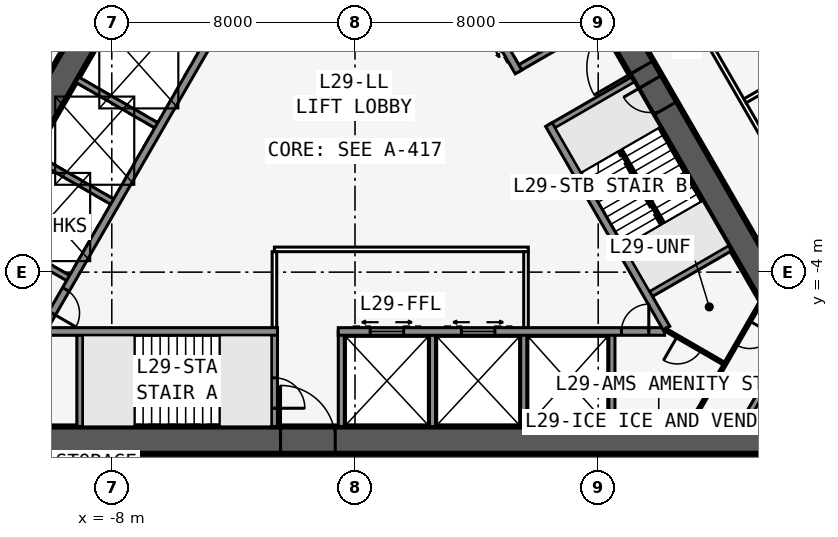
"""IFC4 building model, lengths in metres.
Left out: names, types, materials, properties, quantities, classifications, styles, units other than length and angle.
Written with IfcOpenShell. Run it as: python <this file> out.ifc"""

import sys

from ifc_helpers import new_model, si_unit, direction, frame, frame_2d, origin, place, context, subcontext, project, spatial, rectangle, extrude, element, fill, save


model = new_model("IFC4")
c1 = context("Model", 3, precision=1e-05, world=origin(), true_north=direction((0.0, 1.0)))
c2 = subcontext(c1, "Body", "Model", "MODEL_VIEW")
j1 = project(units=[si_unit("LENGTHUNIT", "METRE"), si_unit("PLANEANGLEUNIT", "RADIAN")], contexts=[c1])
p1 = place(None, origin())
s1 = spatial("IfcSite", under=j1, at=p1, CompositionType="ELEMENT")
p2 = place(p1, origin())
s2 = spatial("IfcBuilding", under=s1, at=p2, CompositionType="ELEMENT")
p3 = place(p2, frame((0.0, 0.0, 114.7)))
s3 = spatial("IfcBuildingStorey", under=s2, at=p3, CompositionType="ELEMENT", Elevation=114.7)
p4 = place(p3, frame((-16.5, -9.526, 0.0), z_axis=(0.0, 0.0, 1.0), x_axis=(1.0, 0.0, 0.0)))
e1 = element("IfcWall", 1, at=p4, inside=s3, PredefinedType="SHEAR", context=c2, shape_type="SweptSolid", body=[
    extrude(rectangle(XDim=33.0, YDim=0.9, at=frame_2d((16.5, 0.0))), origin(), (0.0, 0.0, 1.0), 3.4),
])
p5 = place(p4, frame((14.05, 0.0, 0.0)))
e2 = element("IfcOpeningElement", 2, at=p5, cuts=e1, PredefinedType="OPENING", context=c2, shape_type="SweptSolid", body=[
    extrude(rectangle(XDim=1.8, YDim=2.13, at=frame_2d((0.9, 1.065))), frame((0.0, 0.46, 0.0), z_axis=(0.0, -1.0, 0.0), x_axis=(1.0, 0.0, 0.0)), (0.0, 0.0, 1.0), 0.92),
])
p6 = place(p3, frame((-10.183, -5.951, 0.0), z_axis=(0.0, 0.0, 1.0), x_axis=(1.0, 0.0, 0.0)))
e3 = element("IfcWall", 3, at=p6, inside=s3, PredefinedType="SOLIDWALL", context=c2, shape_type="SweptSolid", body=[
    extrude(rectangle(XDim=7.633, YDim=0.25, at=frame_2d((3.816, 0.0))), origin(), (0.0, 0.0, 1.0), 3.235),
])
p7 = place(p3, frame((-0.55, -5.951, 0.0), z_axis=(0.0, 0.0, 1.0), x_axis=(1.0, 0.0, 0.0)))
e4 = element("IfcWall", 4, at=p7, inside=s3, PredefinedType="SOLIDWALL", context=c2, shape_type="SweptSolid", body=[
    extrude(rectangle(XDim=10.733, YDim=0.25, at=frame_2d((5.366, 0.0))), origin(), (0.0, 0.0, 1.0), 3.235),
])
p8 = place(p7, frame((9.314, 0.0, 0.0)))
e5 = element("IfcOpeningElement", 5, at=p8, cuts=e4, PredefinedType="OPENING", context=c2, shape_type="SweptSolid", body=[
    extrude(rectangle(XDim=0.9, YDim=2.13, at=frame_2d((0.45, 1.065))), frame((0.0, 0.135, 0.0), z_axis=(0.0, -1.0, 0.0), x_axis=(1.0, 0.0, 0.0)), (0.0, 0.0, 1.0), 0.27),
])
p9 = place(p7, frame((1.05, 0.0, 0.0)))
e6 = element("IfcOpeningElement", 6, at=p9, cuts=e4, PredefinedType="OPENING", context=c2, shape_type="SweptSolid", body=[
    extrude(rectangle(XDim=1.1, YDim=2.13, at=frame_2d((0.55, 1.065))), frame((0.0, 0.135, 0.0), z_axis=(0.0, -1.0, 0.0), x_axis=(1.0, 0.0, 0.0)), (0.0, 0.0, 1.0), 0.27),
])
p10 = place(p7, frame((4.05, 0.0, 0.0)))
e7 = element("IfcOpeningElement", 7, at=p10, cuts=e4, PredefinedType="OPENING", context=c2, shape_type="SweptSolid", body=[
    extrude(rectangle(XDim=1.1, YDim=2.13, at=frame_2d((0.55, 1.065))), frame((0.0, 0.135, 0.0), z_axis=(0.0, -1.0, 0.0), x_axis=(1.0, 0.0, 0.0)), (0.0, 0.0, 1.0), 0.27),
])
p11 = place(p3, frame((-9.05, -5.951, 0.0), z_axis=(0.0, 0.0, 1.0), x_axis=(0.0, -1.0, 0.0)))
e8 = element("IfcWall", 8, at=p11, inside=s3, PredefinedType="SOLIDWALL", context=c2, shape_type="SweptSolid", body=[
    extrude(rectangle(XDim=3.125, YDim=0.2, at=frame_2d((1.562, 0.0))), origin(), (0.0, 0.0, 1.0), 3.235),
])
p12 = place(p3, frame((-2.65, -5.951, 0.0), z_axis=(0.0, 0.0, 1.0), x_axis=(0.0, -1.0, 0.0)))
e9 = element("IfcWall", 9, at=p12, inside=s3, PredefinedType="SOLIDWALL", context=c2, shape_type="SweptSolid", body=[
    extrude(rectangle(XDim=3.125, YDim=0.2, at=frame_2d((1.562, 0.0))), origin(), (0.0, 0.0, 1.0), 3.235),
])
p13 = place(p12, frame((1.525, 0.0, 0.0)))
e10 = element("IfcOpeningElement", 10, at=p13, cuts=e9, PredefinedType="OPENING", context=c2, shape_type="SweptSolid", body=[
    extrude(rectangle(XDim=1.0, YDim=2.13, at=frame_2d((0.5, 1.065))), frame((0.0, 0.11, 0.0), z_axis=(0.0, -1.0, 0.0), x_axis=(1.0, 0.0, 0.0)), (0.0, 0.0, 1.0), 0.22),
])
for number, where, z_axis, x_axis in (
    (11, (-0.45, -5.951, 0.0), (0.0, 0.0, 1.0), (0.0, -1.0, 0.0)),
    (12, (2.55, -5.951, 0.0), (0.0, 0.0, 1.0), (0.0, -1.0, 0.0)),
    (13, (5.55, -5.951, 0.0), (0.0, 0.0, 1.0), (0.0, -1.0, 0.0)),
    (14, (8.45, -5.951, 0.0), (0.0, 0.0, 1.0), (0.0, -1.0, 0.0)),
):
    element("IfcWall", number, at=place(p3, frame(where, z_axis=z_axis, x_axis=x_axis)), inside=s3, PredefinedType="SOLIDWALL", context=c2, shape_type="SweptSolid", body=[
        extrude(rectangle(XDim=3.125, YDim=0.2, at=frame_2d((1.562, 0.0))), origin(), (0.0, 0.0, 1.0), 3.235),
    ])
p14 = place(p3, frame((16.5, -9.526, 0.0), z_axis=(0.0, 0.0, 1.0), x_axis=(-0.499999749417, 0.866025548458, 0.0)))
e15 = element("IfcWall", 15, at=p14, inside=s3, PredefinedType="SHEAR", context=c2, shape_type="SweptSolid", body=[
    extrude(rectangle(XDim=33.0, YDim=0.9, at=frame_2d((16.5, 0.0))), origin(), (0.0, 0.0, 1.0), 3.4),
])
p15 = place(p14, frame((14.15, 0.0, 0.0)))
e16 = element("IfcOpeningElement", 16, at=p15, cuts=e15, PredefinedType="OPENING", context=c2, shape_type="SweptSolid", body=[
    extrude(rectangle(XDim=1.8, YDim=2.13, at=frame_2d((0.9, 1.065))), frame((0.0, 0.46, 0.0), z_axis=(0.0, -1.0, 0.0), x_axis=(1.0, 0.0, 0.0)), (0.0, 0.0, 1.0), 0.92),
])
p16 = place(p14, frame((12.6, 0.0, 0.0)))
e17 = element("IfcOpeningElement", 17, at=p16, cuts=e15, PredefinedType="OPENING", context=c2, shape_type="SweptSolid", body=[
    extrude(rectangle(XDim=1.0, YDim=2.13, at=frame_2d((0.5, 1.065))), frame((0.0, 0.46, 0.0), z_axis=(0.0, -1.0, 0.0), x_axis=(1.0, 0.0, 0.0)), (0.0, 0.0, 1.0), 0.92),
])
p17 = place(p3, frame((10.245, -5.843, 0.0), z_axis=(0.0, 0.0, 1.0), x_axis=(-0.499993009313, 0.866029439822, 0.0)))
e18 = element("IfcWall", 18, at=p17, inside=s3, PredefinedType="SOLIDWALL", context=c2, shape_type="SweptSolid", body=[
    extrude(rectangle(XDim=7.733, YDim=0.25, at=frame_2d((3.866, 0.0))), origin(), (0.0, 0.0, 1.0), 3.235),
])
p18 = place(p3, frame((5.379, 2.586, 0.0), z_axis=(0.0, 0.0, 1.0), x_axis=(-0.500001375892, 0.866024609411, 0.0)))
e19 = element("IfcWall", 19, at=p18, inside=s3, PredefinedType="SOLIDWALL", context=c2, shape_type="SweptSolid", body=[
    extrude(rectangle(XDim=10.633, YDim=0.25, at=frame_2d((5.316, 0.0))), origin(), (0.0, 0.0, 1.0), 3.235),
])
p19 = place(p18, frame((9.164, 0.0, 0.0)))
e20 = element("IfcOpeningElement", 20, at=p19, cuts=e19, PredefinedType="OPENING", context=c2, shape_type="SweptSolid", body=[
    extrude(rectangle(XDim=0.9, YDim=2.13, at=frame_2d((0.45, 1.065))), frame((0.0, 0.135, 0.0), z_axis=(0.0, -1.0, 0.0), x_axis=(1.0, 0.0, 0.0)), (0.0, 0.0, 1.0), 0.27),
])
p20 = place(p18, frame((1.0, 0.0, 0.0)))
e21 = element("IfcOpeningElement", 21, at=p20, cuts=e19, PredefinedType="OPENING", context=c2, shape_type="SweptSolid", body=[
    extrude(rectangle(XDim=1.1, YDim=2.13, at=frame_2d((0.55, 1.065))), frame((0.0, 0.135, 0.0), z_axis=(0.0, -1.0, 0.0), x_axis=(1.0, 0.0, 0.0)), (0.0, 0.0, 1.0), 0.27),
])
p21 = place(p18, frame((3.9, 0.0, 0.0)))
e22 = element("IfcOpeningElement", 22, at=p21, cuts=e19, PredefinedType="OPENING", context=c2, shape_type="SweptSolid", body=[
    extrude(rectangle(XDim=1.1, YDim=2.13, at=frame_2d((0.55, 1.065))), frame((0.0, 0.135, 0.0), z_axis=(0.0, -1.0, 0.0), x_axis=(1.0, 0.0, 0.0)), (0.0, 0.0, 1.0), 0.27),
])
p22 = place(p18, frame((6.8, 0.0, 0.0)))
e23 = element("IfcOpeningElement", 23, at=p22, cuts=e19, PredefinedType="OPENING", context=c2, shape_type="SweptSolid", body=[
    extrude(rectangle(XDim=1.1, YDim=2.13, at=frame_2d((0.55, 1.065))), frame((0.0, 0.135, 0.0), z_axis=(0.0, -1.0, 0.0), x_axis=(1.0, 0.0, 0.0)), (0.0, 0.0, 1.0), 0.27),
])
for number, where, z_axis, x_axis in (
    (24, (9.629, -4.775, 0.0), (0.0, 0.0, 1.0), (0.866, 0.5, 0.0)),
    (25, (6.429, 0.767, 0.0), (0.0, 0.0, 1.0), (0.866, 0.5, 0.0)),
    (26, (5.329, 2.673, 0.0), (0.0, 0.0, 1.0), (0.866, 0.5, 0.0)),
):
    element("IfcWall", number, at=place(p3, frame(where, z_axis=z_axis, x_axis=x_axis)), inside=s3, PredefinedType="SOLIDWALL", context=c2, shape_type="SweptSolid", body=[
        extrude(rectangle(XDim=3.125, YDim=0.2, at=frame_2d((1.562, 0.0))), origin(), (0.0, 0.0, 1.0), 3.235),
    ])
p23 = place(p3, frame((0.0, 19.052, 0.0), z_axis=(0.0, 0.0, 1.0), x_axis=(-0.499999749417, -0.866025548458, 0.0)))
e27 = element("IfcWall", 27, at=p23, inside=s3, PredefinedType="SHEAR", context=c2, shape_type="SweptSolid", body=[
    extrude(rectangle(XDim=33.0, YDim=0.9, at=frame_2d((16.5, 0.0))), origin(), (0.0, 0.0, 1.0), 3.4),
])
p24 = place(p23, frame((14.15, 0.0, 0.0)))
e28 = element("IfcOpeningElement", 28, at=p24, cuts=e27, PredefinedType="OPENING", context=c2, shape_type="SweptSolid", body=[
    extrude(rectangle(XDim=1.8, YDim=2.13, at=frame_2d((0.9, 1.065))), frame((0.0, 0.46, 0.0), z_axis=(0.0, -1.0, 0.0), x_axis=(1.0, 0.0, 0.0)), (0.0, 0.0, 1.0), 0.92),
])
p25 = place(p23, frame((12.6, 0.0, 0.0)))
e29 = element("IfcOpeningElement", 29, at=p25, cuts=e27, PredefinedType="OPENING", context=c2, shape_type="SweptSolid", body=[
    extrude(rectangle(XDim=1.0, YDim=2.13, at=frame_2d((0.5, 1.065))), frame((0.0, 0.46, 0.0), z_axis=(0.0, -1.0, 0.0), x_axis=(1.0, 0.0, 0.0)), (0.0, 0.0, 1.0), 0.92),
])
p26 = place(p3, frame((-4.929, 3.365, 0.0), z_axis=(0.0, 0.0, 1.0), x_axis=(-0.499991433582, -0.866030349552, 0.0)))
e30 = element("IfcWall", 30, at=p26, inside=s3, PredefinedType="SOLIDWALL", context=c2, shape_type="SweptSolid", body=[
    extrude(rectangle(XDim=10.633, YDim=0.25, at=frame_2d((5.316, 0.0))), origin(), (0.0, 0.0, 1.0), 3.235),
])
p27 = place(p26, frame((9.164, 0.0, 0.0)))
e31 = element("IfcOpeningElement", 31, at=p27, cuts=e30, PredefinedType="OPENING", context=c2, shape_type="SweptSolid", body=[
    extrude(rectangle(XDim=0.9, YDim=2.13, at=frame_2d((0.45, 1.065))), frame((0.0, 0.135, 0.0), z_axis=(0.0, -1.0, 0.0), x_axis=(1.0, 0.0, 0.0)), (0.0, 0.0, 1.0), 0.27),
])
for number, where, z_axis, x_axis in (
    (32, (-4.979, 3.279, 0.0), (0.0, 0.0, 1.0), (-0.866, 0.5, 0.0)),
    (33, (-6.429, 0.767, 0.0), (0.0, 0.0, 1.0), (-0.866, 0.5, 0.0)),
    (34, (-7.879, -1.744, 0.0), (0.0, 0.0, 1.0), (-0.866, 0.5, 0.0)),
    (35, (-9.329, -4.256, 0.0), (0.0, 0.0, 1.0), (-0.866, 0.5, 0.0)),
):
    element("IfcWall", number, at=place(p3, frame(where, z_axis=z_axis, x_axis=x_axis)), inside=s3, PredefinedType="SOLIDWALL", context=c2, shape_type="SweptSolid", body=[
        extrude(rectangle(XDim=3.125, YDim=0.2, at=frame_2d((1.562, 0.0))), origin(), (0.0, 0.0, 1.0), 3.235),
    ])
p28 = place(p3, frame((20.027, -10.985, 0.0), z_axis=(0.0, 0.0, 1.0), x_axis=(-0.500001677587, 0.866024435227, 0.0)))
e36 = element("IfcWall", 36, at=p28, inside=s3, PredefinedType="PARTITIONING", context=c2, shape_type="SweptSolid", body=[
    extrude(rectangle(XDim=39.054, YDim=0.15, at=frame_2d((19.527, 0.0))), origin(), (0.0, 0.0, 1.0), 3.235),
])
p29 = place(p28, frame((0.352, 0.0, 0.0)))
e37 = element("IfcOpeningElement", 37, at=p29, cuts=e36, PredefinedType="OPENING", context=c2, shape_type="SweptSolid", body=[
    extrude(rectangle(XDim=0.95, YDim=2.13, at=frame_2d((0.475, 1.065))), frame((0.0, 0.085, 0.0), z_axis=(0.0, -1.0, 0.0), x_axis=(1.0, 0.0, 0.0)), (0.0, 0.0, 1.0), 0.17),
])
p30 = place(p28, frame((7.752, 0.0, 0.0)))
e38 = element("IfcOpeningElement", 38, at=p30, cuts=e36, PredefinedType="OPENING", context=c2, shape_type="SweptSolid", body=[
    extrude(rectangle(XDim=0.95, YDim=2.13, at=frame_2d((0.475, 1.065))), frame((0.0, 0.085, 0.0), z_axis=(0.0, -1.0, 0.0), x_axis=(1.0, 0.0, 0.0)), (0.0, 0.0, 1.0), 0.17),
])
p31 = place(p28, frame((17.752, 0.0, 0.0)))
e39 = element("IfcOpeningElement", 39, at=p31, cuts=e36, PredefinedType="OPENING", context=c2, shape_type="SweptSolid", body=[
    extrude(rectangle(XDim=0.95, YDim=2.13, at=frame_2d((0.475, 1.065))), frame((0.0, 0.085, 0.0), z_axis=(0.0, -1.0, 0.0), x_axis=(1.0, 0.0, 0.0)), (0.0, 0.0, 1.0), 0.17),
])
p32 = place(p28, frame((22.152, 0.0, 0.0)))
e40 = element("IfcOpeningElement", 40, at=p32, cuts=e36, PredefinedType="OPENING", context=c2, shape_type="SweptSolid", body=[
    extrude(rectangle(XDim=0.95, YDim=2.13, at=frame_2d((0.475, 1.065))), frame((0.0, 0.085, 0.0), z_axis=(0.0, -1.0, 0.0), x_axis=(1.0, 0.0, 0.0)), (0.0, 0.0, 1.0), 0.17),
])
p33 = place(p28, frame((27.152, 0.0, 0.0)))
e41 = element("IfcOpeningElement", 41, at=p33, cuts=e36, PredefinedType="OPENING", context=c2, shape_type="SweptSolid", body=[
    extrude(rectangle(XDim=0.95, YDim=2.13, at=frame_2d((0.475, 1.065))), frame((0.0, 0.085, 0.0), z_axis=(0.0, -1.0, 0.0), x_axis=(1.0, 0.0, 0.0)), (0.0, 0.0, 1.0), 0.17),
])
p34 = place(p28, frame((36.546, 0.0, 0.0)))
e42 = element("IfcOpeningElement", 42, at=p34, cuts=e36, PredefinedType="OPENING", context=c2, shape_type="SweptSolid", body=[
    extrude(rectangle(XDim=0.95, YDim=2.13, at=frame_2d((0.475, 1.065))), frame((0.0, 0.085, 0.0), z_axis=(0.0, -1.0, 0.0), x_axis=(1.0, 0.0, 0.0)), (0.0, 0.0, 1.0), 0.17),
])
p35 = place(p3, frame((12.829, 1.633, 0.0), z_axis=(0.0, 0.0, 1.0), x_axis=(0.866027015393, 0.499997208602, 0.0)))
e43 = element("IfcWall", 43, at=p35, inside=s3, PredefinedType="PARTITIONING", context=c2, shape_type="SweptSolid", body=[
    extrude(rectangle(XDim=8.922, YDim=0.15, at=frame_2d((4.461, 0.0))), origin(), (0.0, 0.0, 1.0), 2.389),
])
p36 = place(p3, frame((-0.5, 22.836, 0.0), z_axis=(0.0, 0.0, 1.0), x_axis=(-0.500001677587, -0.866024435227, 0.0)))
e44 = element("IfcWall", 44, at=p36, inside=s3, PredefinedType="PARTITIONING", context=c2, shape_type="SweptSolid", body=[
    extrude(rectangle(XDim=39.054, YDim=0.15, at=frame_2d((19.527, 0.0))), origin(), (0.0, 0.0, 1.0), 3.235),
])
p37 = place(p36, frame((0.352, 0.0, 0.0)))
e45 = element("IfcOpeningElement", 45, at=p37, cuts=e44, PredefinedType="OPENING", context=c2, shape_type="SweptSolid", body=[
    extrude(rectangle(XDim=0.95, YDim=2.13, at=frame_2d((0.475, 1.065))), frame((0.0, 0.085, 0.0), z_axis=(0.0, -1.0, 0.0), x_axis=(1.0, 0.0, 0.0)), (0.0, 0.0, 1.0), 0.17),
])
p38 = place(p36, frame((7.152, 0.0, 0.0)))
e46 = element("IfcOpeningElement", 46, at=p38, cuts=e44, PredefinedType="OPENING", context=c2, shape_type="SweptSolid", body=[
    extrude(rectangle(XDim=0.95, YDim=2.13, at=frame_2d((0.475, 1.065))), frame((0.0, 0.085, 0.0), z_axis=(0.0, -1.0, 0.0), x_axis=(1.0, 0.0, 0.0)), (0.0, 0.0, 1.0), 0.17),
])
p39 = place(p36, frame((12.152, 0.0, 0.0)))
e47 = element("IfcOpeningElement", 47, at=p39, cuts=e44, PredefinedType="OPENING", context=c2, shape_type="SweptSolid", body=[
    extrude(rectangle(XDim=0.95, YDim=2.13, at=frame_2d((0.475, 1.065))), frame((0.0, 0.085, 0.0), z_axis=(0.0, -1.0, 0.0), x_axis=(1.0, 0.0, 0.0)), (0.0, 0.0, 1.0), 0.17),
])
p40 = place(p36, frame((17.152, 0.0, 0.0)))
e48 = element("IfcOpeningElement", 48, at=p40, cuts=e44, PredefinedType="OPENING", context=c2, shape_type="SweptSolid", body=[
    extrude(rectangle(XDim=0.95, YDim=2.13, at=frame_2d((0.475, 1.065))), frame((0.0, 0.085, 0.0), z_axis=(0.0, -1.0, 0.0), x_axis=(1.0, 0.0, 0.0)), (0.0, 0.0, 1.0), 0.17),
])
p41 = place(p36, frame((22.752, 0.0, 0.0)))
e49 = element("IfcOpeningElement", 49, at=p41, cuts=e44, PredefinedType="OPENING", context=c2, shape_type="SweptSolid", body=[
    extrude(rectangle(XDim=0.95, YDim=2.13, at=frame_2d((0.475, 1.065))), frame((0.0, 0.085, 0.0), z_axis=(0.0, -1.0, 0.0), x_axis=(1.0, 0.0, 0.0)), (0.0, 0.0, 1.0), 0.17),
])
p42 = place(p36, frame((32.152, 0.0, 0.0)))
e50 = element("IfcOpeningElement", 50, at=p42, cuts=e44, PredefinedType="OPENING", context=c2, shape_type="SweptSolid", body=[
    extrude(rectangle(XDim=0.95, YDim=2.13, at=frame_2d((0.475, 1.065))), frame((0.0, 0.085, 0.0), z_axis=(0.0, -1.0, 0.0), x_axis=(1.0, 0.0, 0.0)), (0.0, 0.0, 1.0), 0.17),
])
p43 = place(p36, frame((37.752, 0.0, 0.0)))
e51 = element("IfcOpeningElement", 51, at=p43, cuts=e44, PredefinedType="OPENING", context=c2, shape_type="SweptSolid", body=[
    extrude(rectangle(XDim=0.95, YDim=2.13, at=frame_2d((0.475, 1.065))), frame((0.0, 0.085, 0.0), z_axis=(0.0, -1.0, 0.0), x_axis=(1.0, 0.0, 0.0)), (0.0, 0.0, 1.0), 0.17),
])
p44 = place(p3, frame((-2.65, -3.251, 0.0), z_axis=(0.0, 0.0, 1.0), x_axis=(1.0, 0.0, 0.0)))
e52 = element("IfcWall", 52, at=p44, inside=s3, PredefinedType="PARTITIONING", context=c2, shape_type="SweptSolid", body=[
    extrude(rectangle(XDim=8.35, YDim=0.15, at=frame_2d((4.175, 0.0))), origin(), (0.0, 0.0, 1.0), 3.235),
])
for number, where, z_axis, x_axis in (
    (53, (-2.65, -5.826, 0.0), (0.0, 0.0, 1.0), (0.0, 1.0, 0.0)),
    (54, (5.625, -5.826, 0.0), (0.0, 0.0, 1.0), (0.0, 1.0, 0.0)),
):
    element("IfcWall", number, at=place(p3, frame(where, z_axis=z_axis, x_axis=x_axis)), inside=s3, PredefinedType="PARTITIONING", context=c2, shape_type="SweptSolid", body=[
        extrude(rectangle(XDim=2.5, YDim=0.15, at=frame_2d((1.25, 0.0))), origin(), (0.0, 0.0, 1.0), 3.235),
    ])
p45 = place(p3, frame((14.219, -6.476, 0.0), z_axis=(0.0, 0.0, 1.0), x_axis=(-0.499952404951, -0.866052881055, 0.0)))
e55 = element("IfcWall", 55, at=p45, inside=s3, PredefinedType="SOLIDWALL", context=c2, shape_type="SweptSolid", body=[
    extrude(rectangle(XDim=3.002, YDim=0.2, at=frame_2d((1.501, 0.0))), origin(), (0.0, 0.0, 1.0), 3.235),
])
p46 = place(p3, frame((13.354, -4.976, 0.0), z_axis=(0.0, 0.0, 1.0), x_axis=(-0.499999210213, -0.866025859768, 0.0)))
e56 = element("IfcWall", 56, at=p46, inside=s3, PredefinedType="PARTITIONING", context=c2, shape_type="SweptSolid", body=[
    extrude(rectangle(XDim=4.734, YDim=0.1, at=frame_2d((2.367, 0.0))), origin(), (0.0, 0.0, 1.0), 3.235),
])
p47 = place(p46, frame((0.734, 0.0, 0.0)))
e57 = element("IfcOpeningElement", 57, at=p47, cuts=e56, PredefinedType="OPENING", context=c2, shape_type="SweptSolid", body=[
    extrude(rectangle(XDim=0.9, YDim=2.13, at=frame_2d((0.45, 1.065))), frame((0.0, 0.06, 0.0), z_axis=(0.0, -1.0, 0.0), x_axis=(1.0, 0.0, 0.0)), (0.0, 0.0, 1.0), 0.12),
])
p48 = place(p3, frame((12.17, -7.026, 0.0), z_axis=(0.0, 0.0, 1.0), x_axis=(-0.866015833478, 0.50001657589, 0.0)))
e58 = element("IfcWall", 58, at=p48, inside=s3, PredefinedType="PARTITIONING", context=c2, shape_type="SweptSolid", body=[
    extrude(rectangle(XDim=2.275, YDim=0.1, at=frame_2d((1.138, 0.0))), origin(), (0.0, 0.0, 1.0), 3.235),
])
p49 = place(p48, frame((0.915, 0.0, 0.0)))
e59 = element("IfcOpeningElement", 59, at=p49, cuts=e58, PredefinedType="OPENING", context=c2, shape_type="SweptSolid", body=[
    extrude(rectangle(XDim=0.9, YDim=2.13, at=frame_2d((0.45, 1.065))), frame((0.0, 0.06, 0.0), z_axis=(0.0, -1.0, 0.0), x_axis=(1.0, 0.0, 0.0)), (0.0, 0.0, 1.0), 0.12),
])
p50 = place(p3, frame((-7.247, -7.576, 0.0), z_axis=(0.0, 0.0, 1.0), x_axis=(1.0, 0.0, 0.0)))
e60 = element("IfcWall", 60, at=p50, inside=s3, PredefinedType="SOLIDWALL", context=c2, shape_type="SweptSolid", body=[
    extrude(rectangle(XDim=2.794, YDim=0.1, at=frame_2d((1.397, 0.0))), origin(), (0.0, 0.0, 1.0), 3.4),
])
p51 = place(p3, frame((10.135, -2.401, 0.0), z_axis=(0.0, 0.0, 1.0), x_axis=(-0.499992232847, 0.866029888106, 0.0)))
e61 = element("IfcWall", 61, at=p51, inside=s3, PredefinedType="SOLIDWALL", context=c2, shape_type="SweptSolid", body=[
    extrude(rectangle(XDim=2.794, YDim=0.1, at=frame_2d((1.397, 0.0))), origin(), (0.0, 0.0, 1.0), 3.4),
])
p52 = place(p5, origin())
e62 = element("IfcDoor", 62, at=p52, inside=s3, OperationType="DOUBLE_DOOR_SINGLE_SWING", PredefinedType="DOOR", context=c2, shape_type="SweptSolid", body=[
    extrude(rectangle(XDim=1.8, YDim=2.13, at=frame_2d((0.9, 1.065))), frame((0.0, 0.025, 0.0), z_axis=(0.0, -1.0, 0.0), x_axis=(1.0, 0.0, 0.0)), (0.0, 0.0, 1.0), 0.05),
])
fill(e2, e62)
p53 = place(p13, origin())
e63 = element("IfcDoor", 63, at=p53, inside=s3, OperationType="SINGLE_SWING_RIGHT", PredefinedType="DOOR", context=c2, shape_type="SweptSolid", body=[
    extrude(rectangle(XDim=1.0, YDim=2.13, at=frame_2d((0.5, 1.065))), frame((0.0, 0.025, 0.0), z_axis=(0.0, -1.0, 0.0), x_axis=(1.0, 0.0, 0.0)), (0.0, 0.0, 1.0), 0.05),
])
fill(e10, e63)
p54 = place(p15, origin())
e64 = element("IfcDoor", 64, at=p54, inside=s3, OperationType="DOUBLE_DOOR_SINGLE_SWING", PredefinedType="DOOR", context=c2, shape_type="SweptSolid", body=[
    extrude(rectangle(XDim=1.8, YDim=2.13, at=frame_2d((0.9, 1.065))), frame((0.0, 0.025, 0.0), z_axis=(0.0, -1.0, 0.0), x_axis=(1.0, 0.0, 0.0)), (0.0, 0.0, 1.0), 0.05),
])
fill(e16, e64)
p55 = place(p16, origin())
e65 = element("IfcDoor", 65, at=p55, inside=s3, OperationType="SINGLE_SWING_RIGHT", PredefinedType="DOOR", context=c2, shape_type="SweptSolid", body=[
    extrude(rectangle(XDim=1.0, YDim=2.13, at=frame_2d((0.5, 1.065))), frame((0.0, 0.025, 0.0), z_axis=(0.0, -1.0, 0.0), x_axis=(1.0, 0.0, 0.0)), (0.0, 0.0, 1.0), 0.05),
])
fill(e17, e65)
p56 = place(p47, origin())
e66 = element("IfcDoor", 66, at=p56, inside=s3, OperationType="SINGLE_SWING_LEFT", PredefinedType="DOOR", context=c2, shape_type="SweptSolid", body=[
    extrude(rectangle(XDim=0.9, YDim=2.13, at=frame_2d((0.45, 1.065))), frame((0.0, 0.025, 0.0), z_axis=(0.0, -1.0, 0.0), x_axis=(1.0, 0.0, 0.0)), (0.0, 0.0, 1.0), 0.05),
])
fill(e57, e66)
p57 = place(p8, origin())
e67 = element("IfcDoor", 67, at=p57, inside=s3, OperationType="SINGLE_SWING_RIGHT", PredefinedType="DOOR", context=c2, shape_type="SweptSolid", body=[
    extrude(rectangle(XDim=0.9, YDim=2.13, at=frame_2d((0.45, 1.065))), frame((0.0, 0.025, 0.0), z_axis=(0.0, -1.0, 0.0), x_axis=(1.0, 0.0, 0.0)), (0.0, 0.0, 1.0), 0.05),
])
fill(e5, e67)
p58 = place(p49, origin())
e68 = element("IfcDoor", 68, at=p58, inside=s3, OperationType="SINGLE_SWING_RIGHT", PredefinedType="DOOR", context=c2, shape_type="SweptSolid", body=[
    extrude(rectangle(XDim=0.9, YDim=2.13, at=frame_2d((0.45, 1.065))), frame((0.0, 0.025, 0.0), z_axis=(0.0, -1.0, 0.0), x_axis=(1.0, 0.0, 0.0)), (0.0, 0.0, 1.0), 0.05),
])
fill(e59, e68)
p59 = place(p27, origin())
e69 = element("IfcDoor", 69, at=p59, inside=s3, OperationType="SINGLE_SWING_RIGHT", PredefinedType="DOOR", context=c2, shape_type="SweptSolid", body=[
    extrude(rectangle(XDim=0.9, YDim=2.13, at=frame_2d((0.45, 1.065))), frame((0.0, 0.025, 0.0), z_axis=(0.0, -1.0, 0.0), x_axis=(1.0, 0.0, 0.0)), (0.0, 0.0, 1.0), 0.05),
])
fill(e31, e69)
p60 = place(p9, origin())
e70 = element("IfcDoor", 70, at=p60, inside=s3, OperationType="DOUBLE_DOOR_SLIDING", PredefinedType="USERDEFINED", context=c2, shape_type="SweptSolid", body=[
    extrude(rectangle(XDim=1.1, YDim=2.13, at=frame_2d((0.55, 1.065))), frame((0.0, 0.025, 0.0), z_axis=(0.0, -1.0, 0.0), x_axis=(1.0, 0.0, 0.0)), (0.0, 0.0, 1.0), 0.05),
])
fill(e6, e70)
p61 = place(p10, origin())
e71 = element("IfcDoor", 71, at=p61, inside=s3, OperationType="DOUBLE_DOOR_SLIDING", PredefinedType="USERDEFINED", context=c2, shape_type="SweptSolid", body=[
    extrude(rectangle(XDim=1.1, YDim=2.13, at=frame_2d((0.55, 1.065))), frame((0.0, 0.025, 0.0), z_axis=(0.0, -1.0, 0.0), x_axis=(1.0, 0.0, 0.0)), (0.0, 0.0, 1.0), 0.05),
])
fill(e7, e71)
save(model, sys.argv[1])
